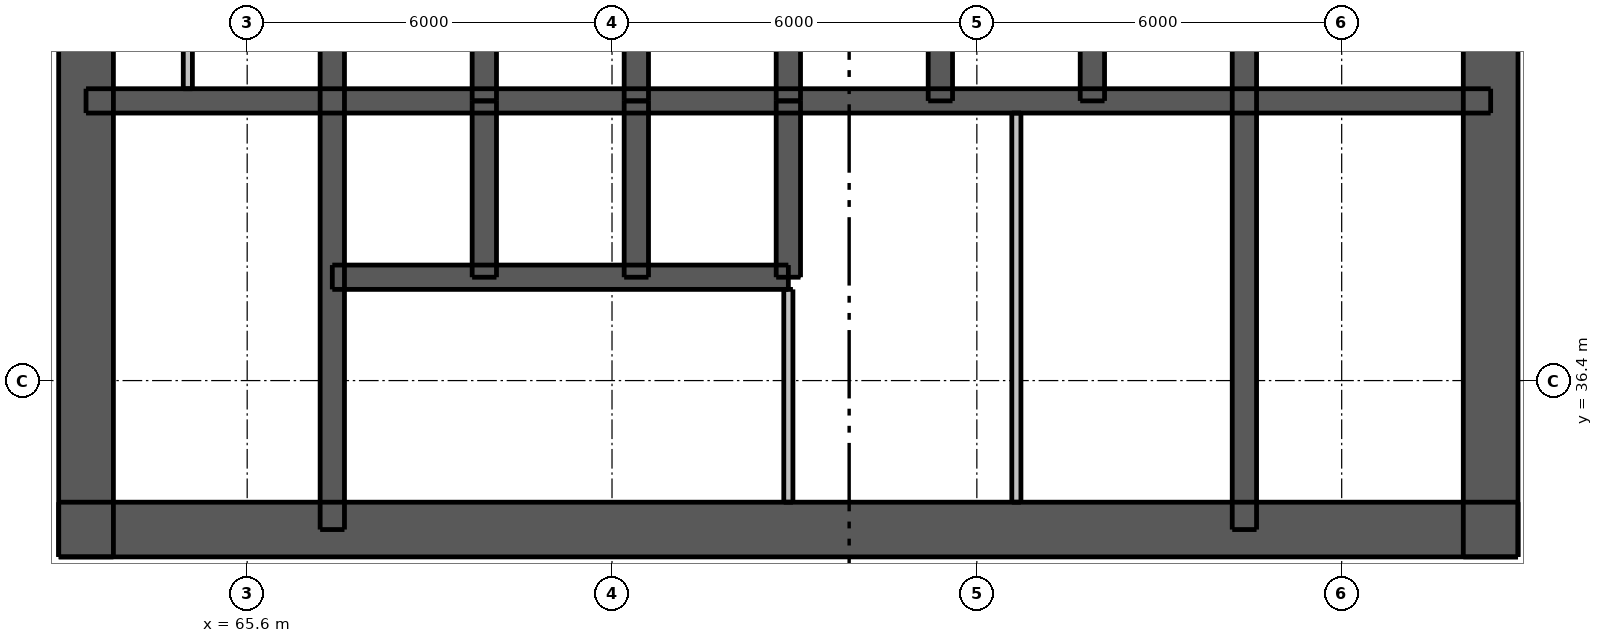
"""IFC4 building model, lengths in metres.
Left out: names, types, materials, properties, quantities, classifications, styles, units other than length and angle.
Written with IfcOpenShell. Run it as: python <this file> out.ifc"""

import sys

from ifc_helpers import new_model, si_unit, direction, frame, frame_2d, origin, place, context, subcontext, project, spatial, rectangle, extrude, element, fill, save


model = new_model("IFC4")
c1 = context("Model", 3, precision=1e-05, world=origin(), true_north=direction((0.0, 1.0)))
c2 = subcontext(c1, "Body", "Model", "MODEL_VIEW")
j1 = project(units=[si_unit("LENGTHUNIT", "METRE"), si_unit("PLANEANGLEUNIT", "RADIAN")], contexts=[c1])
p1 = place(None, origin())
s1 = spatial("IfcSite", under=j1, at=p1, CompositionType="ELEMENT")
p2 = place(p1, origin())
s2 = spatial("IfcBuilding", under=s1, at=p2, CompositionType="ELEMENT")
p3 = place(p2, frame((0.0, 0.0, 19.0)))
s3 = spatial("IfcBuildingStorey", under=s2, at=p3, CompositionType="ELEMENT", Elevation=19.0)
p4 = place(p3, frame((62.5, 33.95, 0.0), z_axis=(0.0, 0.0, 1.0), x_axis=(1.0, 0.0, 0.0)))
e1 = element("IfcWall", 1, at=p4, inside=s3, PredefinedType="SHEAR", context=c2, shape_type="SweptSolid", body=[
    extrude(rectangle(XDim=24.0, YDim=0.9, at=frame_2d((12.0, 0.0))), origin(), (0.0, 0.0, 1.0), 4.25),
])
p5 = place(p4, frame((2.05, 0.0, 0.0)))
e2 = element("IfcOpeningElement", 2, at=p5, cuts=e1, PredefinedType="OPENING", context=c2, shape_type="SweptSolid", body=[
    extrude(rectangle(XDim=1.1, YDim=2.1, at=frame_2d((0.55, 1.05))), frame((0.0, 0.46, 0.0), z_axis=(0.0, -1.0, 0.0), x_axis=(1.0, 0.0, 0.0)), (0.0, 0.0, 1.0), 0.92),
])
p6 = place(p4, frame((20.85, 0.0, 0.0)))
e3 = element("IfcOpeningElement", 3, at=p6, cuts=e1, PredefinedType="OPENING", context=c2, shape_type="SweptSolid", body=[
    extrude(rectangle(XDim=1.1, YDim=2.1, at=frame_2d((0.55, 1.05))), frame((0.0, 0.46, 0.0), z_axis=(0.0, -1.0, 0.0), x_axis=(1.0, 0.0, 0.0)), (0.0, 0.0, 1.0), 0.92),
])
p7 = place(p4, frame((8.0, 0.0, 0.0)))
e4 = element("IfcOpeningElement", 4, at=p7, cuts=e1, PredefinedType="OPENING", context=c2, shape_type="SweptSolid", body=[
    extrude(rectangle(XDim=1.1, YDim=2.1, at=frame_2d((0.55, 1.05))), frame((0.0, 0.46, 0.0), z_axis=(0.0, -1.0, 0.0), x_axis=(1.0, 0.0, 0.0)), (0.0, 0.0, 1.0), 0.92),
])
p8 = place(p4, frame((13.525, 0.0, 0.0)))
e5 = element("IfcOpeningElement", 5, at=p8, cuts=e1, PredefinedType="OPENING", context=c2, shape_type="SweptSolid", body=[
    extrude(rectangle(XDim=0.9, YDim=2.1, at=frame_2d((0.45, 1.05))), frame((0.0, 0.46, 0.0), z_axis=(0.0, -1.0, 0.0), x_axis=(1.0, 0.0, 0.0)), (0.0, 0.0, 1.0), 0.92),
])
p9 = place(p4, frame((17.075, 0.0, 0.0)))
e6 = element("IfcOpeningElement", 6, at=p9, cuts=e1, PredefinedType="OPENING", context=c2, shape_type="SweptSolid", body=[
    extrude(rectangle(XDim=0.9, YDim=2.1, at=frame_2d((0.45, 1.05))), frame((0.0, 0.46, 0.0), z_axis=(0.0, -1.0, 0.0), x_axis=(1.0, 0.0, 0.0)), (0.0, 0.0, 1.0), 0.92),
])
p10 = place(p3, frame((62.95, 33.5, 0.0), z_axis=(0.0, 0.0, 1.0), x_axis=(0.0, 1.0, 0.0)))
e7 = element("IfcWall", 7, at=p10, inside=s3, PredefinedType="SHEAR", context=c2, shape_type="SweptSolid", body=[
    extrude(rectangle(XDim=24.0, YDim=0.9, at=frame_2d((12.0, 0.0))), origin(), (0.0, 0.0, 1.0), 4.25),
])
p11 = place(p10, frame((11.2, 0.0, 0.0)))
e8 = element("IfcOpeningElement", 8, at=p11, cuts=e7, PredefinedType="OPENING", context=c2, shape_type="SweptSolid", body=[
    extrude(rectangle(XDim=1.6, YDim=2.1, at=frame_2d((0.8, 1.05))), frame((0.0, 0.46, 0.0), z_axis=(0.0, -1.0, 0.0), x_axis=(1.0, 0.0, 0.0)), (0.0, 0.0, 1.0), 0.92),
])
p12 = place(p3, frame((86.05, 33.5, 0.0), z_axis=(0.0, 0.0, 1.0), x_axis=(0.0, 1.0, 0.0)))
e9 = element("IfcWall", 9, at=p12, inside=s3, PredefinedType="SHEAR", context=c2, shape_type="SweptSolid", body=[
    extrude(rectangle(XDim=24.0, YDim=0.9, at=frame_2d((12.0, 0.0))), origin(), (0.0, 0.0, 1.0), 4.25),
])
p13 = place(p12, frame((11.2, 0.0, 0.0)))
e10 = element("IfcOpeningElement", 10, at=p13, cuts=e9, PredefinedType="OPENING", context=c2, shape_type="SweptSolid", body=[
    extrude(rectangle(XDim=1.6, YDim=2.1, at=frame_2d((0.8, 1.05))), frame((0.0, 0.46, 0.0), z_axis=(0.0, -1.0, 0.0), x_axis=(1.0, 0.0, 0.0)), (0.0, 0.0, 1.0), 0.92),
])
p14 = place(p3, frame((62.95, 41.0, 0.0), z_axis=(0.0, 0.0, 1.0), x_axis=(1.0, 0.0, 0.0)))
e11 = element("IfcWall", 11, at=p14, inside=s3, PredefinedType="SHEAR", context=c2, shape_type="SweptSolid", body=[
    extrude(rectangle(XDim=23.1, YDim=0.4, at=frame_2d((11.55, 0.0))), origin(), (0.0, 0.0, 1.0), 4.25),
])
p15 = place(p3, frame((67.0, 33.95, 0.0), z_axis=(0.0, 0.0, 1.0), x_axis=(0.0, 1.0, 0.0)))
e12 = element("IfcWall", 12, at=p15, inside=s3, PredefinedType="SHEAR", context=c2, shape_type="SweptSolid", body=[
    extrude(rectangle(XDim=9.95, YDim=0.4, at=frame_2d((4.975, 0.0))), origin(), (0.0, 0.0, 1.0), 4.25),
])
p16 = place(p15, frame((0.65, 0.0, 0.0)))
e13 = element("IfcOpeningElement", 13, at=p16, cuts=e12, PredefinedType="OPENING", context=c2, shape_type="SweptSolid", body=[
    extrude(rectangle(XDim=1.1, YDim=2.1, at=frame_2d((0.55, 1.05))), frame((0.0, 0.21, 0.0), z_axis=(0.0, -1.0, 0.0), x_axis=(1.0, 0.0, 0.0)), (0.0, 0.0, 1.0), 0.42),
])
p17 = place(p3, frame((82.0, 33.95, 0.0), z_axis=(0.0, 0.0, 1.0), x_axis=(0.0, 1.0, 0.0)))
e14 = element("IfcWall", 14, at=p17, inside=s3, PredefinedType="SHEAR", context=c2, shape_type="SweptSolid", body=[
    extrude(rectangle(XDim=9.95, YDim=0.4, at=frame_2d((4.975, 0.0))), origin(), (0.0, 0.0, 1.0), 4.25),
])
for number, where, z_axis, x_axis in (
    (15, (69.5, 41.0, 0.0), (0.0, 0.0, 1.0), (0.0, 1.0, 0.0)),
    (16, (72.0, 41.0, 0.0), (0.0, 0.0, 1.0), (0.0, 1.0, 0.0)),
    (17, (74.5, 41.0, 0.0), (0.0, 0.0, 1.0), (0.0, 1.0, 0.0)),
    (18, (77.0, 41.0, 0.0), (0.0, 0.0, 1.0), (0.0, 1.0, 0.0)),
    (19, (79.5, 41.0, 0.0), (0.0, 0.0, 1.0), (0.0, 1.0, 0.0)),
):
    element("IfcWall", number, at=place(p3, frame(where, z_axis=z_axis, x_axis=x_axis)), inside=s3, PredefinedType="SHEAR", context=c2, shape_type="SweptSolid", body=[
        extrude(rectangle(XDim=2.9, YDim=0.4, at=frame_2d((1.45, 0.0))), origin(), (0.0, 0.0, 1.0), 4.25),
    ])
p18 = place(p3, frame((67.0, 38.1, 0.0), z_axis=(0.0, 0.0, 1.0), x_axis=(1.0, 0.0, 0.0)))
e20 = element("IfcWall", 20, at=p18, inside=s3, PredefinedType="SHEAR", context=c2, shape_type="SweptSolid", body=[
    extrude(rectangle(XDim=7.5, YDim=0.4, at=frame_2d((3.75, 0.0))), origin(), (0.0, 0.0, 1.0), 4.25),
])
p19 = place(p18, frame((0.7, 0.0, 0.0)))
e21 = element("IfcOpeningElement", 21, at=p19, cuts=e20, PredefinedType="OPENING", context=c2, shape_type="SweptSolid", body=[
    extrude(rectangle(XDim=1.1, YDim=2.1, at=frame_2d((0.55, 1.05))), frame((0.0, 0.21, 0.0), z_axis=(0.0, -1.0, 0.0), x_axis=(1.0, 0.0, 0.0)), (0.0, 0.0, 1.0), 0.42),
])
p20 = place(p18, frame((3.2, 0.0, 0.0)))
e22 = element("IfcOpeningElement", 22, at=p20, cuts=e20, PredefinedType="OPENING", context=c2, shape_type="SweptSolid", body=[
    extrude(rectangle(XDim=1.1, YDim=2.1, at=frame_2d((0.55, 1.05))), frame((0.0, 0.21, 0.0), z_axis=(0.0, -1.0, 0.0), x_axis=(1.0, 0.0, 0.0)), (0.0, 0.0, 1.0), 0.42),
])
p21 = place(p18, frame((5.65, 0.0, 0.0)))
e23 = element("IfcOpeningElement", 23, at=p21, cuts=e20, PredefinedType="OPENING", context=c2, shape_type="SweptSolid", body=[
    extrude(rectangle(XDim=1.2, YDim=2.1, at=frame_2d((0.6, 1.05))), frame((0.0, 0.21, 0.0), z_axis=(0.0, -1.0, 0.0), x_axis=(1.0, 0.0, 0.0)), (0.0, 0.0, 1.0), 0.42),
])
for number, where, z_axis, x_axis in (
    (24, (69.5, 38.1, 0.0), (0.0, 0.0, 1.0), (0.0, 1.0, 0.0)),
    (25, (72.0, 38.1, 0.0), (0.0, 0.0, 1.0), (0.0, 1.0, 0.0)),
    (26, (74.5, 38.1, 0.0), (0.0, 0.0, 1.0), (0.0, 1.0, 0.0)),
):
    element("IfcWall", number, at=place(p3, frame(where, z_axis=z_axis, x_axis=x_axis)), inside=s3, PredefinedType="SHEAR", context=c2, shape_type="SweptSolid", body=[
        extrude(rectangle(XDim=2.9, YDim=0.4, at=frame_2d((1.45, 0.0))), origin(), (0.0, 0.0, 1.0), 4.25),
    ])
p22 = place(p3, frame((74.5, 34.4, 0.0), z_axis=(0.0, 0.0, 1.0), x_axis=(0.0, 1.0, 0.0)))
e27 = element("IfcWall", 27, at=p22, inside=s3, PredefinedType="PLUMBINGWALL", context=c2, shape_type="SweptSolid", body=[
    extrude(rectangle(XDim=3.5, YDim=0.15, at=frame_2d((1.75, 0.0))), origin(), (0.0, 0.0, 1.0), 4.25),
])
p23 = place(p3, frame((78.25, 34.4, 0.0), z_axis=(0.0, 0.0, 1.0), x_axis=(0.0, 1.0, 0.0)))
e28 = element("IfcWall", 28, at=p23, inside=s3, PredefinedType="PLUMBINGWALL", context=c2, shape_type="SweptSolid", body=[
    extrude(rectangle(XDim=6.4, YDim=0.15, at=frame_2d((3.2, 0.0))), origin(), (0.0, 0.0, 1.0), 4.25),
])
p24 = place(p3, frame((64.624, 41.2, 0.0), z_axis=(0.0, 0.0, 1.0), x_axis=(0.0, 1.0, 0.0)))
e29 = element("IfcWall", 29, at=p24, inside=s3, PredefinedType="PLUMBINGWALL", context=c2, shape_type="SweptSolid", body=[
    extrude(rectangle(XDim=2.5, YDim=0.15, at=frame_2d((1.25, 0.0))), origin(), (0.0, 0.0, 1.0), 4.25),
])
p25 = place(p5, origin())
e30 = element("IfcDoor", 30, at=p25, inside=s3, OperationType="SINGLE_SWING_LEFT", PredefinedType="DOOR", context=c2, shape_type="SweptSolid", body=[
    extrude(rectangle(XDim=1.1, YDim=2.1, at=frame_2d((0.55, 1.05))), frame((0.0, 0.438, 0.0), z_axis=(0.0, -1.0, 0.0), x_axis=(1.0, 0.0, 0.0)), (0.0, 0.0, 1.0), 0.05),
])
fill(e2, e30)
p26 = place(p6, origin())
e31 = element("IfcDoor", 31, at=p26, inside=s3, OperationType="SINGLE_SWING_RIGHT", PredefinedType="DOOR", context=c2, shape_type="SweptSolid", body=[
    extrude(rectangle(XDim=1.1, YDim=2.1, at=frame_2d((0.55, 1.05))), frame((0.0, 0.438, 0.0), z_axis=(0.0, -1.0, 0.0), x_axis=(1.0, 0.0, 0.0)), (0.0, 0.0, 1.0), 0.05),
])
fill(e3, e31)
p27 = place(p7, origin())
e32 = element("IfcDoor", 32, at=p27, inside=s3, OperationType="SINGLE_SWING_LEFT", PredefinedType="DOOR", context=c2, shape_type="SweptSolid", body=[
    extrude(rectangle(XDim=1.1, YDim=2.1, at=frame_2d((0.55, 1.05))), frame((0.0, 0.438, 0.0), z_axis=(0.0, -1.0, 0.0), x_axis=(1.0, 0.0, 0.0)), (0.0, 0.0, 1.0), 0.05),
])
fill(e4, e32)
p28 = place(p16, origin())
e33 = element("IfcDoor", 33, at=p28, inside=s3, OperationType="SINGLE_SWING_RIGHT", PredefinedType="DOOR", context=c2, shape_type="SweptSolid", body=[
    extrude(rectangle(XDim=1.1, YDim=2.1, at=frame_2d((0.55, 1.05))), frame((0.0, -0.138, 0.0), z_axis=(0.0, -1.0, 0.0), x_axis=(1.0, 0.0, 0.0)), (0.0, 0.0, 1.0), 0.05),
])
fill(e13, e33)
p29 = place(p8, origin())
e34 = element("IfcDoor", 34, at=p29, inside=s3, OperationType="SINGLE_SWING_LEFT", PredefinedType="DOOR", context=c2, shape_type="SweptSolid", body=[
    extrude(rectangle(XDim=0.9, YDim=2.1, at=frame_2d((0.45, 1.05))), frame((0.0, 0.438, 0.0), z_axis=(0.0, -1.0, 0.0), x_axis=(1.0, 0.0, 0.0)), (0.0, 0.0, 1.0), 0.05),
])
fill(e5, e34)
p30 = place(p9, origin())
e35 = element("IfcDoor", 35, at=p30, inside=s3, OperationType="SINGLE_SWING_LEFT", PredefinedType="DOOR", context=c2, shape_type="SweptSolid", body=[
    extrude(rectangle(XDim=0.9, YDim=2.1, at=frame_2d((0.45, 1.05))), frame((0.0, 0.438, 0.0), z_axis=(0.0, -1.0, 0.0), x_axis=(1.0, 0.0, 0.0)), (0.0, 0.0, 1.0), 0.05),
])
fill(e6, e35)
p31 = place(p19, origin())
e36 = element("IfcDoor", 36, at=p31, inside=s3, OperationType="DOUBLE_DOOR_SLIDING", PredefinedType="DOOR", context=c2, shape_type="SweptSolid", body=[
    extrude(rectangle(XDim=1.1, YDim=2.1, at=frame_2d((0.55, 1.05))), frame((0.0, 0.025, 0.0), z_axis=(0.0, -1.0, 0.0), x_axis=(1.0, 0.0, 0.0)), (0.0, 0.0, 1.0), 0.05),
])
fill(e21, e36)
p32 = place(p20, origin())
e37 = element("IfcDoor", 37, at=p32, inside=s3, OperationType="DOUBLE_DOOR_SLIDING", PredefinedType="DOOR", context=c2, shape_type="SweptSolid", body=[
    extrude(rectangle(XDim=1.1, YDim=2.1, at=frame_2d((0.55, 1.05))), frame((0.0, 0.025, 0.0), z_axis=(0.0, -1.0, 0.0), x_axis=(1.0, 0.0, 0.0)), (0.0, 0.0, 1.0), 0.05),
])
fill(e22, e37)
p33 = place(p21, origin())
e38 = element("IfcDoor", 38, at=p33, inside=s3, OperationType="DOUBLE_DOOR_SLIDING", PredefinedType="DOOR", context=c2, shape_type="SweptSolid", body=[
    extrude(rectangle(XDim=1.2, YDim=2.1, at=frame_2d((0.6, 1.05))), frame((0.0, 0.025, 0.0), z_axis=(0.0, -1.0, 0.0), x_axis=(1.0, 0.0, 0.0)), (0.0, 0.0, 1.0), 0.05),
])
fill(e23, e38)
save(model, sys.argv[1])
